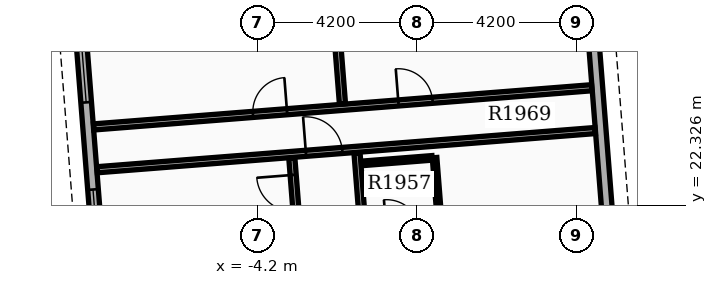
"""IFC4 building model, lengths in metres.
Left out: names, types, materials, properties, quantities, classifications, styles, units other than length and angle.
Written with IfcOpenShell. Run it as: python <this file> out.ifc"""

import sys

from ifc_helpers import new_model, si_unit, direction, frame, frame_2d, origin, place, context, subcontext, project, spatial, rectangle, extrude, element, fill, save


model = new_model("IFC4")
c1 = context("Model", 3, precision=1e-05, world=origin(), true_north=direction((0.0, 1.0)))
c2 = subcontext(c1, "Body", "Model", "MODEL_VIEW")
j1 = project(units=[si_unit("LENGTHUNIT", "METRE"), si_unit("PLANEANGLEUNIT", "RADIAN")], contexts=[c1])
p1 = place(None, origin())
s1 = spatial("IfcSite", under=j1, at=p1, CompositionType="ELEMENT")
p2 = place(p1, origin())
s2 = spatial("IfcBuilding", under=s1, at=p2, CompositionType="ELEMENT")
p3 = place(p2, frame((0.0, 0.0, 124.2)))
s3 = spatial("IfcBuildingStorey", under=s2, at=p3, CompositionType="ELEMENT", Elevation=124.2)
p4 = place(p3, frame((5.527, 15.421, 0.0), z_axis=(0.0, 0.0, 1.0), x_axis=(-0.078452802979, 0.996917828963, 0.0)))
e1 = element("IfcWall", 1, at=p4, inside=s3, PredefinedType="STANDARD", context=c2, shape_type="SweptSolid", body=[
    extrude(rectangle(XDim=20.1, YDim=0.28, at=frame_2d((10.05, 0.0))), origin(), (0.0, 0.0, 1.0), 2.97),
])
p5 = place(p4, frame((1.6, 0.0, 0.8)))
e2 = element("IfcOpeningElement", 2, at=p5, cuts=e1, PredefinedType="OPENING", context=c2, shape_type="SweptSolid", body=[
    extrude(rectangle(XDim=1.4, YDim=1.6, at=frame_2d((0.7, 0.8))), frame((0.0, 0.15, 0.0), z_axis=(0.0, -1.0, 0.0), x_axis=(1.0, 0.0, 0.0)), (0.0, 0.0, 1.0), 0.3),
])
p6 = place(p4, frame((4.8, 0.0, 0.8)))
e3 = element("IfcOpeningElement", 3, at=p6, cuts=e1, PredefinedType="OPENING", context=c2, shape_type="SweptSolid", body=[
    extrude(rectangle(XDim=1.4, YDim=1.6, at=frame_2d((0.7, 0.8))), frame((0.0, 0.15, 0.0), z_axis=(0.0, -1.0, 0.0), x_axis=(1.0, 0.0, 0.0)), (0.0, 0.0, 1.0), 0.3),
])
p7 = place(p4, frame((12.75, 0.0, 0.8)))
e4 = element("IfcOpeningElement", 4, at=p7, cuts=e1, PredefinedType="OPENING", context=c2, shape_type="SweptSolid", body=[
    extrude(rectangle(XDim=1.4, YDim=1.6, at=frame_2d((0.7, 0.8))), frame((0.0, 0.15, 0.0), z_axis=(0.0, -1.0, 0.0), x_axis=(1.0, 0.0, 0.0)), (0.0, 0.0, 1.0), 0.3),
])
p8 = place(p4, frame((15.95, 0.0, 0.8)))
e5 = element("IfcOpeningElement", 5, at=p8, cuts=e1, PredefinedType="OPENING", context=c2, shape_type="SweptSolid", body=[
    extrude(rectangle(XDim=1.4, YDim=1.6, at=frame_2d((0.7, 0.8))), frame((0.0, 0.15, 0.0), z_axis=(0.0, -1.0, 0.0), x_axis=(1.0, 0.0, 0.0)), (0.0, 0.0, 1.0), 0.3),
])
p9 = place(p3, frame((-9.448, 34.405, 0.0), z_axis=(0.0, 0.0, 1.0), x_axis=(0.078452802979, -0.996917828963, 0.0)))
e6 = element("IfcWall", 6, at=p9, inside=s3, PredefinedType="STANDARD", context=c2, shape_type="SweptSolid", body=[
    extrude(rectangle(XDim=20.1, YDim=0.28, at=frame_2d((10.05, 0.0))), origin(), (0.0, 0.0, 1.0), 2.97),
])
p10 = place(p9, frame((1.6, 0.0, 0.8)))
e7 = element("IfcOpeningElement", 7, at=p10, cuts=e6, PredefinedType="OPENING", context=c2, shape_type="SweptSolid", body=[
    extrude(rectangle(XDim=1.4, YDim=1.6, at=frame_2d((0.7, 0.8))), frame((0.0, 0.15, 0.0), z_axis=(0.0, -1.0, 0.0), x_axis=(1.0, 0.0, 0.0)), (0.0, 0.0, 1.0), 0.3),
])
p11 = place(p9, frame((4.8, 0.0, 0.8)))
e8 = element("IfcOpeningElement", 8, at=p11, cuts=e6, PredefinedType="OPENING", context=c2, shape_type="SweptSolid", body=[
    extrude(rectangle(XDim=1.4, YDim=1.6, at=frame_2d((0.7, 0.8))), frame((0.0, 0.15, 0.0), z_axis=(0.0, -1.0, 0.0), x_axis=(1.0, 0.0, 0.0)), (0.0, 0.0, 1.0), 0.3),
])
p12 = place(p9, frame((8.0, 0.0, 0.8)))
e9 = element("IfcOpeningElement", 9, at=p12, cuts=e6, PredefinedType="OPENING", context=c2, shape_type="SweptSolid", body=[
    extrude(rectangle(XDim=1.4, YDim=1.6, at=frame_2d((0.7, 0.8))), frame((0.0, 0.15, 0.0), z_axis=(0.0, -1.0, 0.0), x_axis=(1.0, 0.0, 0.0)), (0.0, 0.0, 1.0), 0.3),
])
p13 = place(p9, frame((11.7, 0.0, 0.8)))
e10 = element("IfcOpeningElement", 10, at=p13, cuts=e6, PredefinedType="OPENING", context=c2, shape_type="SweptSolid", body=[
    extrude(rectangle(XDim=1.4, YDim=1.6, at=frame_2d((0.7, 0.8))), frame((0.0, 0.15, 0.0), z_axis=(0.0, -1.0, 0.0), x_axis=(1.0, 0.0, 0.0)), (0.0, 0.0, 1.0), 0.3),
])
p14 = place(p3, frame((-0.886, 14.826, 0.0), z_axis=(0.0, 0.0, 1.0), x_axis=(-0.078454258523, 0.996917714418, 0.0)))
e11 = element("IfcWall", 11, at=p14, inside=s3, PredefinedType="PARTITIONING", context=c2, shape_type="SweptSolid", body=[
    extrude(rectangle(XDim=8.9, YDim=0.16, at=frame_2d((4.45, 0.0))), origin(), (0.0, 0.0, 1.0), 2.96),
])
p15 = place(p14, frame((0.953, 0.0, 0.0)))
e12 = element("IfcOpeningElement", 12, at=p15, cuts=e11, PredefinedType="OPENING", context=c2, shape_type="SweptSolid", body=[
    extrude(rectangle(XDim=0.96, YDim=2.15, at=frame_2d((0.48, 1.075))), frame((0.0, 0.09, 0.0), z_axis=(0.0, -1.0, 0.0), x_axis=(1.0, 0.0, 0.0)), (0.0, 0.0, 1.0), 0.18),
])
p16 = place(p3, frame((-1.423, 23.431, 0.0), z_axis=(0.0, 0.0, 1.0), x_axis=(0.996915574626, 0.078481444107, 0.0)))
e13 = element("IfcWall", 13, at=p16, inside=s3, PredefinedType="PARTITIONING", context=c2, shape_type="SweptSolid", body=[
    extrude(rectangle(XDim=1.82, YDim=0.12, at=frame_2d((0.91, 0.0))), origin(), (0.0, 0.0, 1.0), 2.96),
])
p17 = place(p3, frame((0.604, 21.704, 0.0), z_axis=(0.0, 0.0, 1.0), x_axis=(-0.07843418698, 0.996919293781, 0.0)))
e14 = element("IfcWall", 14, at=p17, inside=s3, PredefinedType="PARTITIONING", context=c2, shape_type="SweptSolid", body=[
    extrude(rectangle(XDim=1.88, YDim=0.12, at=frame_2d((0.94, 0.0))), origin(), (0.0, 0.0, 1.0), 2.96),
])
p18 = place(p3, frame((-2.601, 14.691, 0.0), z_axis=(0.0, 0.0, 1.0), x_axis=(-0.07848152115, 0.99691556856, 0.0)))
e15 = element("IfcWall", 15, at=p18, inside=s3, PredefinedType="PARTITIONING", context=c2, shape_type="SweptSolid", body=[
    extrude(rectangle(XDim=8.9, YDim=0.16, at=frame_2d((4.45, 0.0))), origin(), (0.0, 0.0, 1.0), 2.96),
])
p19 = place(p18, frame((7.5, 0.0, 0.0)))
e16 = element("IfcOpeningElement", 16, at=p19, cuts=e15, PredefinedType="OPENING", context=c2, shape_type="SweptSolid", body=[
    extrude(rectangle(XDim=0.96, YDim=2.15, at=frame_2d((0.48, 1.075))), frame((0.0, 0.09, 0.0), z_axis=(0.0, -1.0, 0.0), x_axis=(1.0, 0.0, 0.0)), (0.0, 0.0, 1.0), 0.18),
])
p20 = place(p3, frame((-8.423, 23.261, 0.0), z_axis=(0.0, 0.0, 1.0), x_axis=(0.996917447065, 0.078457655694, 0.0)))
e17 = element("IfcWall", 17, at=p20, inside=s3, PredefinedType="PARTITIONING", context=c2, shape_type="SweptSolid", body=[
    extrude(rectangle(XDim=13.144, YDim=0.16, at=frame_2d((6.572, 0.0))), origin(), (0.0, 0.0, 1.0), 2.96),
])
p21 = place(p20, frame((5.512, 0.0, 0.0)))
e18 = element("IfcOpeningElement", 18, at=p21, cuts=e17, PredefinedType="OPENING", context=c2, shape_type="SweptSolid", body=[
    extrude(rectangle(XDim=0.96, YDim=2.15, at=frame_2d((0.48, 1.075))), frame((0.0, 0.09, 0.0), z_axis=(0.0, -1.0, 0.0), x_axis=(1.0, 0.0, 0.0)), (0.0, 0.0, 1.0), 0.18),
])
p22 = place(p3, frame((-8.512, 24.387, 0.0), z_axis=(0.0, 0.0, 1.0), x_axis=(0.996915994096, 0.078476115573, 0.0)))
e19 = element("IfcWall", 19, at=p22, inside=s3, PredefinedType="PARTITIONING", context=c2, shape_type="SweptSolid", body=[
    extrude(rectangle(XDim=13.144, YDim=0.16, at=frame_2d((6.572, 0.0))), origin(), (0.0, 0.0, 1.0), 2.96),
])
p23 = place(p22, frame((4.202, 0.0, 0.0)))
e20 = element("IfcOpeningElement", 20, at=p23, cuts=e19, PredefinedType="OPENING", context=c2, shape_type="SweptSolid", body=[
    extrude(rectangle(XDim=0.9, YDim=2.15, at=frame_2d((0.45, 1.075))), frame((0.0, 0.09, 0.0), z_axis=(0.0, -1.0, 0.0), x_axis=(1.0, 0.0, 0.0)), (0.0, 0.0, 1.0), 0.18),
])
p24 = place(p22, frame((8.042, 0.0, 0.0)))
e21 = element("IfcOpeningElement", 21, at=p24, cuts=e19, PredefinedType="OPENING", context=c2, shape_type="SweptSolid", body=[
    extrude(rectangle(XDim=0.9, YDim=2.15, at=frame_2d((0.45, 1.075))), frame((0.0, 0.09, 0.0), z_axis=(0.0, -1.0, 0.0), x_axis=(1.0, 0.0, 0.0)), (0.0, 0.0, 1.0), 0.18),
])
p25 = place(p3, frame((-1.967, 24.993, 0.0), z_axis=(0.0, 0.0, 1.0), x_axis=(-0.078446753713, 0.996918304994, 0.0)))
e22 = element("IfcWall", 22, at=p25, inside=s3, PredefinedType="PARTITIONING", context=c2, shape_type="SweptSolid", body=[
    extrude(rectangle(XDim=9.962, YDim=0.16, at=frame_2d((4.981, 0.0))), origin(), (0.0, 0.0, 1.0), 2.96),
])
p26 = place(p12, origin())
e23 = element("IfcWindow", 23, at=p26, inside=s3, PartitioningType="SINGLE_PANEL", PredefinedType="WINDOW", context=c2, shape_type="SweptSolid", body=[
    extrude(rectangle(XDim=1.4, YDim=1.6, at=frame_2d((0.7, 0.8))), frame((0.0, 0.03, 0.0), z_axis=(0.0, -1.0, 0.0), x_axis=(1.0, 0.0, 0.0)), (0.0, 0.0, 1.0), 0.06),
])
fill(e9, e23)
p27 = place(p13, origin())
e24 = element("IfcWindow", 24, at=p27, inside=s3, PartitioningType="SINGLE_PANEL", PredefinedType="WINDOW", context=c2, shape_type="SweptSolid", body=[
    extrude(rectangle(XDim=1.4, YDim=1.6, at=frame_2d((0.7, 0.8))), frame((0.0, 0.03, 0.0), z_axis=(0.0, -1.0, 0.0), x_axis=(1.0, 0.0, 0.0)), (0.0, 0.0, 1.0), 0.06),
])
fill(e10, e24)
p28 = place(p19, origin())
e25 = element("IfcDoor", 25, at=p28, inside=s3, OperationType="SINGLE_SWING_RIGHT", PredefinedType="DOOR", context=c2, shape_type="SweptSolid", body=[
    extrude(rectangle(XDim=0.96, YDim=2.15, at=frame_2d((0.48, 1.075))), frame((0.0, 0.025, 0.0), z_axis=(0.0, -1.0, 0.0), x_axis=(1.0, 0.0, 0.0)), (0.0, 0.0, 1.0), 0.05),
])
fill(e16, e25)
p29 = place(p21, origin())
e26 = element("IfcDoor", 26, at=p29, inside=s3, OperationType="SINGLE_SWING_LEFT", PredefinedType="DOOR", context=c2, shape_type="SweptSolid", body=[
    extrude(rectangle(XDim=0.96, YDim=2.15, at=frame_2d((0.48, 1.075))), frame((0.0, 0.025, 0.0), z_axis=(0.0, -1.0, 0.0), x_axis=(1.0, 0.0, 0.0)), (0.0, 0.0, 1.0), 0.05),
])
fill(e18, e26)
p30 = place(p23, origin())
e27 = element("IfcDoor", 27, at=p30, inside=s3, OperationType="SINGLE_SWING_RIGHT", PredefinedType="DOOR", context=c2, shape_type="SweptSolid", body=[
    extrude(rectangle(XDim=0.9, YDim=2.15, at=frame_2d((0.45, 1.075))), frame((0.0, 0.025, 0.0), z_axis=(0.0, -1.0, 0.0), x_axis=(1.0, 0.0, 0.0)), (0.0, 0.0, 1.0), 0.05),
])
fill(e20, e27)
p31 = place(p24, origin())
e28 = element("IfcDoor", 28, at=p31, inside=s3, OperationType="SINGLE_SWING_LEFT", PredefinedType="DOOR", context=c2, shape_type="SweptSolid", body=[
    extrude(rectangle(XDim=0.9, YDim=2.15, at=frame_2d((0.45, 1.075))), frame((0.0, 0.025, 0.0), z_axis=(0.0, -1.0, 0.0), x_axis=(1.0, 0.0, 0.0)), (0.0, 0.0, 1.0), 0.05),
])
fill(e21, e28)
save(model, sys.argv[1])
